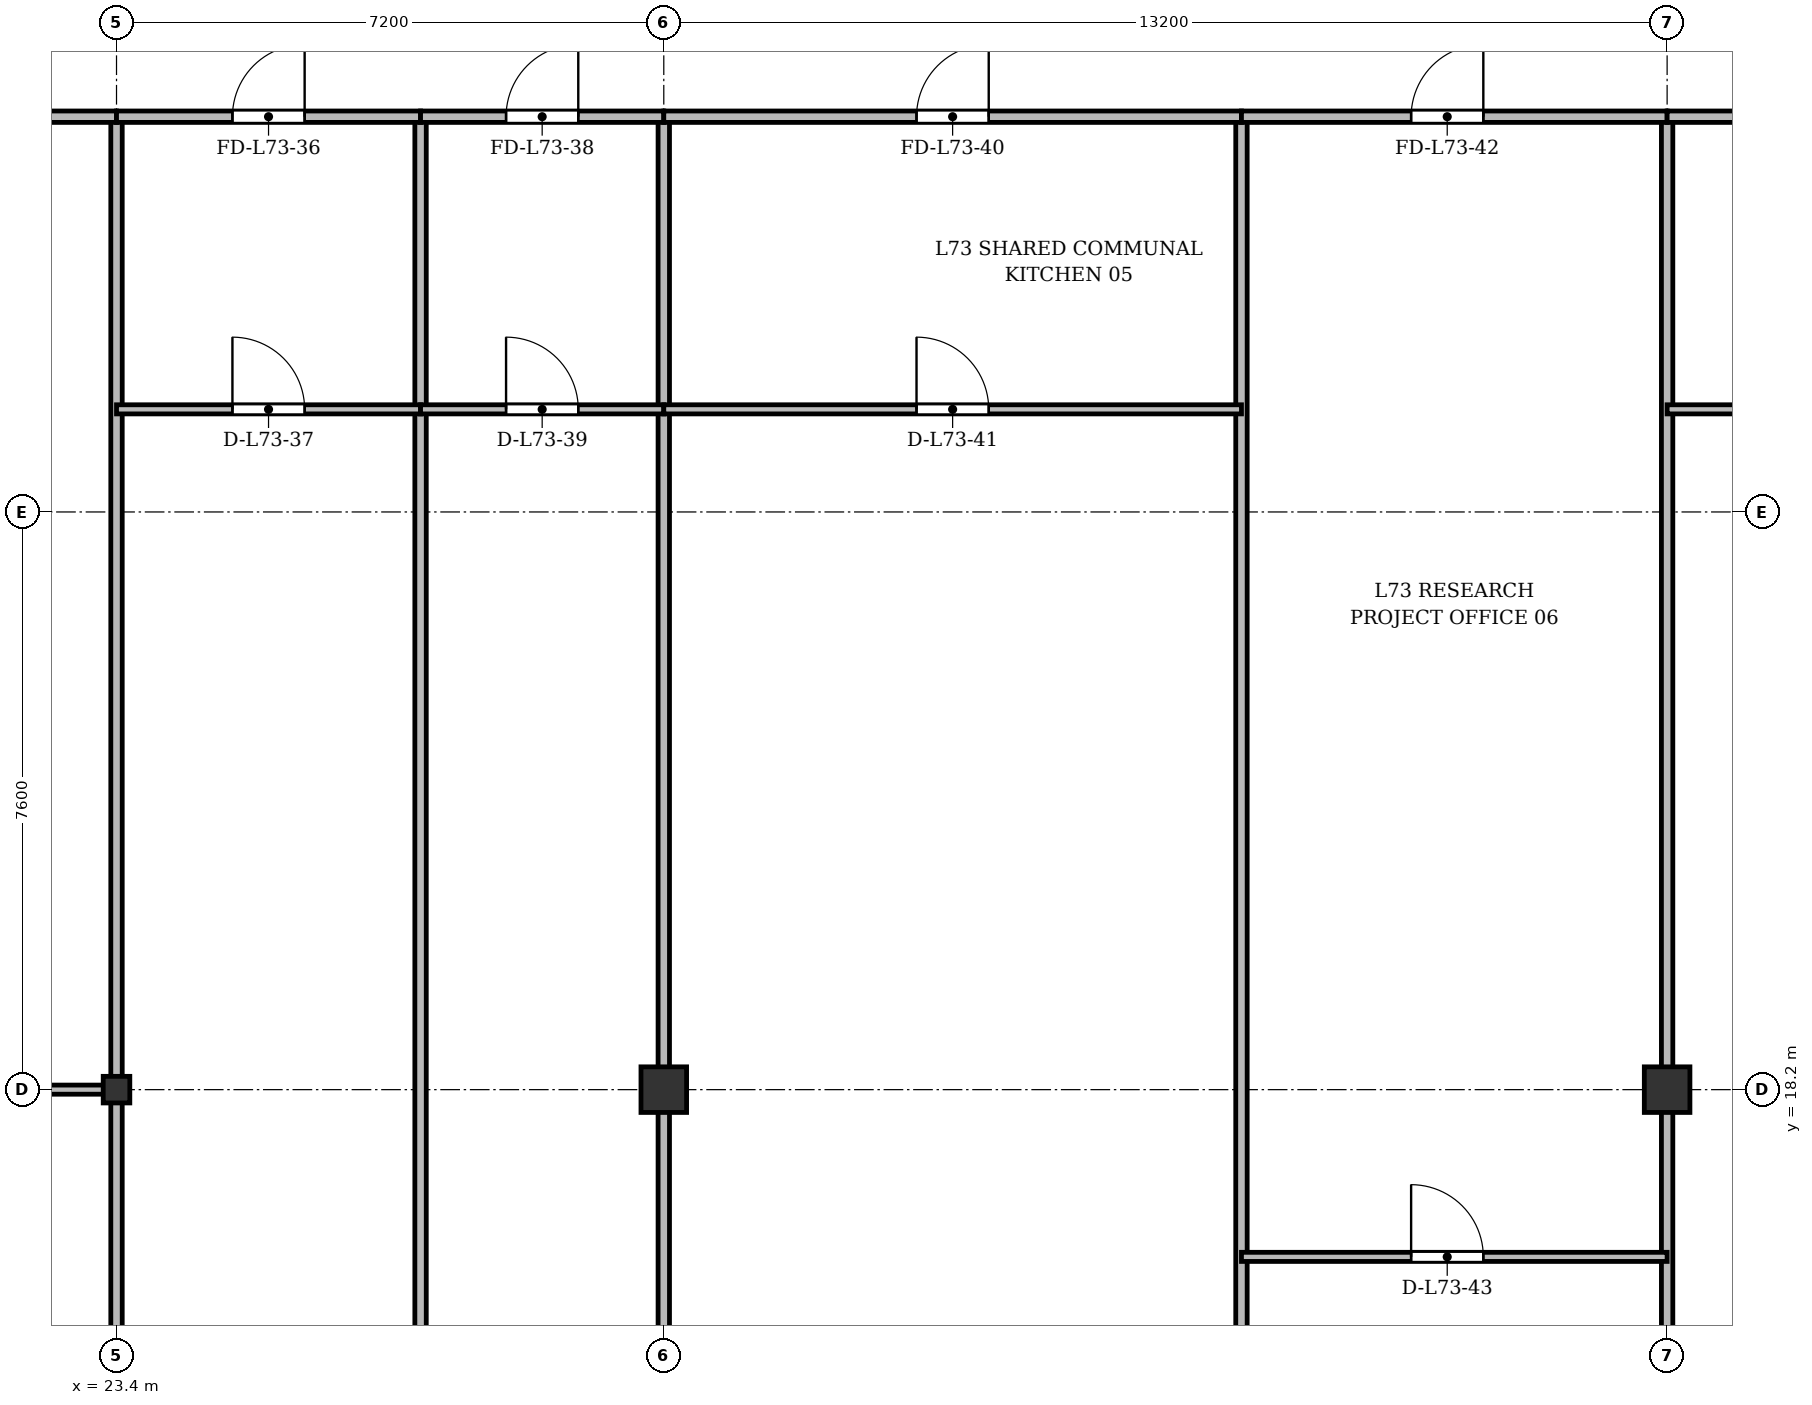
"""IFC4 building model, lengths in metres.
Left out: names, types, materials, properties, quantities, classifications, styles, units other than length and angle.
Written with IfcOpenShell. Run it as: python <this file> out.ifc"""

import sys

from ifc_helpers import new_model, si_unit, direction, frame, frame_2d, origin, origin_2d, place, context, subcontext, project, spatial, rectangle, i_section, extrude, source, transform, mapped, element, fill, save


model = new_model("IFC4")
c1 = context("Model", 3, precision=1e-05, world=origin(), true_north=direction((0.0, 1.0)))
c2 = subcontext(c1, "Body", "Model", "MODEL_VIEW")
j1 = project(units=[si_unit("LENGTHUNIT", "METRE"), si_unit("PLANEANGLEUNIT", "RADIAN")], contexts=[c1])
p1 = place(None, origin())
s1 = spatial("IfcSite", under=j1, at=p1, CompositionType="ELEMENT")
p2 = place(p1, origin())
s2 = spatial("IfcBuilding", under=s1, at=p2, CompositionType="ELEMENT")
p3 = place(p2, frame((0.0, 0.0, 281.1)))
s3 = spatial("IfcBuildingStorey", under=s2, at=p3, CompositionType="ELEMENT", Elevation=281.1)
m1 = source(origin(), c2, "Body", "SweptSolid", [
    extrude(i_section(OverallWidth=0.35, OverallDepth=0.35, WebThickness=0.018, FlangeThickness=0.028, at=origin_2d()), origin(), (0.0, 0.0, 1.0), 3.6),
])
p4 = place(p3, frame((23.4, 18.2, 0.0), z_axis=(0.0, 0.0, 1.0), x_axis=(1.0, 0.0, 0.0)))
e1 = element("IfcColumn", 1, at=p4, inside=s3, PredefinedType="COLUMN", context=c2, shape_type="MappedRepresentation", body=[
    mapped(m1, transform((0.0, 0.0, 0.0), x_axis=(1.0, 0.0, 0.0), y_axis=(0.0, 1.0, 0.0), z_axis=(0.0, 0.0, 1.0), scale=1.0)),
])
m2 = source(origin(), c2, "Body", "SweptSolid", [
    extrude(rectangle(XDim=0.6, YDim=0.6, at=origin_2d()), origin(), (0.0, 0.0, 1.0), 3.6),
])
for number, where, z_axis, x_axis in (
    (2, (30.6, 18.2, 0.0), (0.0, 0.0, 1.0), (1.0, 0.0, 0.0)),
    (3, (43.8, 18.2, 0.0), (0.0, 0.0, 1.0), (1.0, 0.0, 0.0)),
):
    element("IfcColumn", number, at=place(p3, frame(where, z_axis=z_axis, x_axis=x_axis)), inside=s3, PredefinedType="COLUMN", context=c2, shape_type="MappedRepresentation", body=[
        mapped(m2, transform((0.0, 0.0, 0.0), x_axis=(1.0, 0.0, 0.0), y_axis=(0.0, 1.0, 0.0), z_axis=(0.0, 0.0, 1.0), scale=1.0)),
    ])
p5 = place(p3, frame((23.4, 3.725, 0.0), z_axis=(0.0, 0.0, 1.0), x_axis=(0.0, 1.0, 0.0)))
e4 = element("IfcWall", 4, at=p5, inside=s3, PredefinedType="PARTITIONING", context=c2, shape_type="SweptSolid", body=[
    extrude(rectangle(XDim=27.275, YDim=0.15, at=frame_2d((13.637, 0.0))), origin(), (0.0, 0.0, 1.0), 2.87),
])
p6 = place(p3, frame((27.4, 3.725, 0.0), z_axis=(0.0, 0.0, 1.0), x_axis=(0.0, 1.0, 0.0)))
e5 = element("IfcWall", 5, at=p6, inside=s3, PredefinedType="PARTITIONING", context=c2, shape_type="SweptSolid", body=[
    extrude(rectangle(XDim=27.275, YDim=0.15, at=frame_2d((13.637, 0.0))), origin(), (0.0, 0.0, 1.0), 2.92),
])
p7 = place(p3, frame((30.6, 3.725, 0.0), z_axis=(0.0, 0.0, 1.0), x_axis=(0.0, 1.0, 0.0)))
e6 = element("IfcWall", 6, at=p7, inside=s3, PredefinedType="PARTITIONING", context=c2, shape_type="SweptSolid", body=[
    extrude(rectangle(XDim=27.275, YDim=0.15, at=frame_2d((13.637, 0.0))), origin(), (0.0, 0.0, 1.0), 2.87),
])
p8 = place(p3, frame((38.2, 3.725, 0.0), z_axis=(0.0, 0.0, 1.0), x_axis=(0.0, 1.0, 0.0)))
e7 = element("IfcWall", 7, at=p8, inside=s3, PredefinedType="PARTITIONING", context=c2, shape_type="SweptSolid", body=[
    extrude(rectangle(XDim=27.275, YDim=0.15, at=frame_2d((13.637, 0.0))), origin(), (0.0, 0.0, 1.0), 2.92),
])
p9 = place(p3, frame((43.8, 3.725, 0.0), z_axis=(0.0, 0.0, 1.0), x_axis=(0.0, 1.0, 0.0)))
e8 = element("IfcWall", 8, at=p9, inside=s3, PredefinedType="PARTITIONING", context=c2, shape_type="SweptSolid", body=[
    extrude(rectangle(XDim=27.275, YDim=0.15, at=frame_2d((13.637, 0.0))), origin(), (0.0, 0.0, 1.0), 2.87),
])
p10 = place(p3, frame((14.4, 18.2, 0.0), z_axis=(0.0, 0.0, 1.0), x_axis=(1.0, 0.0, 0.0)))
e9 = element("IfcWall", 9, at=p10, inside=s3, PredefinedType="PARTITIONING", context=c2, shape_type="SweptSolid", body=[
    extrude(rectangle(XDim=9.0, YDim=0.12, at=frame_2d((4.5, 0.0))), origin(), (0.0, 0.0, 1.0), 2.92),
])
p11 = place(p10, frame((4.025, 0.0, 0.0)))
e10 = element("IfcOpeningElement", 10, at=p11, cuts=e9, PredefinedType="OPENING", context=c2, shape_type="SweptSolid", body=[
    extrude(rectangle(XDim=0.95, YDim=2.15, at=frame_2d((0.475, 1.075))), frame((0.0, 0.07, 0.0), z_axis=(0.0, -1.0, 0.0), x_axis=(1.0, 0.0, 0.0)), (0.0, 0.0, 1.0), 0.14),
])
p12 = place(p3, frame((14.4, 31.0, 0.0), z_axis=(0.0, 0.0, 1.0), x_axis=(1.0, 0.0, 0.0)))
e11 = element("IfcWall", 11, at=p12, inside=s3, PredefinedType="PARTITIONING", context=c2, shape_type="SweptSolid", body=[
    extrude(rectangle(XDim=9.0, YDim=0.15, at=frame_2d((4.5, 0.0))), origin(), (0.0, 0.0, 1.0), 2.87),
])
p13 = place(p12, frame((5.971, 0.0, 0.0)))
e12 = element("IfcOpeningElement", 12, at=p13, cuts=e11, PredefinedType="OPENING", context=c2, shape_type="SweptSolid", body=[
    extrude(rectangle(XDim=0.95, YDim=2.15, at=frame_2d((0.475, 1.075))), frame((0.0, 0.085, 0.0), z_axis=(0.0, -1.0, 0.0), x_axis=(1.0, 0.0, 0.0)), (0.0, 0.0, 1.0), 0.17),
])
p14 = place(p3, frame((23.4, 31.0, 0.0), z_axis=(0.0, 0.0, 1.0), x_axis=(1.0, 0.0, 0.0)))
e13 = element("IfcWall", 13, at=p14, inside=s3, PredefinedType="PARTITIONING", context=c2, shape_type="SweptSolid", body=[
    extrude(rectangle(XDim=4.0, YDim=0.15, at=frame_2d((2.0, 0.0))), origin(), (0.0, 0.0, 1.0), 2.87),
])
p15 = place(p14, frame((1.525, 0.0, 0.0)))
e14 = element("IfcOpeningElement", 14, at=p15, cuts=e13, PredefinedType="OPENING", context=c2, shape_type="SweptSolid", body=[
    extrude(rectangle(XDim=0.95, YDim=2.15, at=frame_2d((0.475, 1.075))), frame((0.0, 0.085, 0.0), z_axis=(0.0, -1.0, 0.0), x_axis=(1.0, 0.0, 0.0)), (0.0, 0.0, 1.0), 0.17),
])
p16 = place(p3, frame((23.4, 27.15, 0.0), z_axis=(0.0, 0.0, 1.0), x_axis=(1.0, 0.0, 0.0)))
e15 = element("IfcWall", 15, at=p16, inside=s3, PredefinedType="PARTITIONING", context=c2, shape_type="SweptSolid", body=[
    extrude(rectangle(XDim=4.0, YDim=0.12, at=frame_2d((2.0, 0.0))), origin(), (0.0, 0.0, 1.0), 2.87),
])
p17 = place(p16, frame((1.525, 0.0, 0.0)))
e16 = element("IfcOpeningElement", 16, at=p17, cuts=e15, PredefinedType="OPENING", context=c2, shape_type="SweptSolid", body=[
    extrude(rectangle(XDim=0.95, YDim=2.15, at=frame_2d((0.475, 1.075))), frame((0.0, 0.07, 0.0), z_axis=(0.0, -1.0, 0.0), x_axis=(1.0, 0.0, 0.0)), (0.0, 0.0, 1.0), 0.14),
])
p18 = place(p3, frame((27.4, 31.0, 0.0), z_axis=(0.0, 0.0, 1.0), x_axis=(1.0, 0.0, 0.0)))
e17 = element("IfcWall", 17, at=p18, inside=s3, PredefinedType="PARTITIONING", context=c2, shape_type="SweptSolid", body=[
    extrude(rectangle(XDim=3.2, YDim=0.15, at=frame_2d((1.6, 0.0))), origin(), (0.0, 0.0, 1.0), 2.87),
])
p19 = place(p18, frame((1.125, 0.0, 0.0)))
e18 = element("IfcOpeningElement", 18, at=p19, cuts=e17, PredefinedType="OPENING", context=c2, shape_type="SweptSolid", body=[
    extrude(rectangle(XDim=0.95, YDim=2.15, at=frame_2d((0.475, 1.075))), frame((0.0, 0.085, 0.0), z_axis=(0.0, -1.0, 0.0), x_axis=(1.0, 0.0, 0.0)), (0.0, 0.0, 1.0), 0.17),
])
p20 = place(p3, frame((27.4, 27.15, 0.0), z_axis=(0.0, 0.0, 1.0), x_axis=(1.0, 0.0, 0.0)))
e19 = element("IfcWall", 19, at=p20, inside=s3, PredefinedType="PARTITIONING", context=c2, shape_type="SweptSolid", body=[
    extrude(rectangle(XDim=3.2, YDim=0.12, at=frame_2d((1.6, 0.0))), origin(), (0.0, 0.0, 1.0), 2.87),
])
p21 = place(p20, frame((1.125, 0.0, 0.0)))
e20 = element("IfcOpeningElement", 20, at=p21, cuts=e19, PredefinedType="OPENING", context=c2, shape_type="SweptSolid", body=[
    extrude(rectangle(XDim=0.95, YDim=2.15, at=frame_2d((0.475, 1.075))), frame((0.0, 0.07, 0.0), z_axis=(0.0, -1.0, 0.0), x_axis=(1.0, 0.0, 0.0)), (0.0, 0.0, 1.0), 0.14),
])
p22 = place(p3, frame((30.6, 31.0, 0.0), z_axis=(0.0, 0.0, 1.0), x_axis=(1.0, 0.0, 0.0)))
e21 = element("IfcWall", 21, at=p22, inside=s3, PredefinedType="PARTITIONING", context=c2, shape_type="SweptSolid", body=[
    extrude(rectangle(XDim=7.6, YDim=0.15, at=frame_2d((3.8, 0.0))), origin(), (0.0, 0.0, 1.0), 2.87),
])
p23 = place(p22, frame((3.325, 0.0, 0.0)))
e22 = element("IfcOpeningElement", 22, at=p23, cuts=e21, PredefinedType="OPENING", context=c2, shape_type="SweptSolid", body=[
    extrude(rectangle(XDim=0.95, YDim=2.15, at=frame_2d((0.475, 1.075))), frame((0.0, 0.085, 0.0), z_axis=(0.0, -1.0, 0.0), x_axis=(1.0, 0.0, 0.0)), (0.0, 0.0, 1.0), 0.17),
])
p24 = place(p3, frame((30.6, 27.15, 0.0), z_axis=(0.0, 0.0, 1.0), x_axis=(1.0, 0.0, 0.0)))
e23 = element("IfcWall", 23, at=p24, inside=s3, PredefinedType="PARTITIONING", context=c2, shape_type="SweptSolid", body=[
    extrude(rectangle(XDim=7.6, YDim=0.12, at=frame_2d((3.8, 0.0))), origin(), (0.0, 0.0, 1.0), 2.87),
])
p25 = place(p24, frame((3.325, 0.0, 0.0)))
e24 = element("IfcOpeningElement", 24, at=p25, cuts=e23, PredefinedType="OPENING", context=c2, shape_type="SweptSolid", body=[
    extrude(rectangle(XDim=0.95, YDim=2.15, at=frame_2d((0.475, 1.075))), frame((0.0, 0.07, 0.0), z_axis=(0.0, -1.0, 0.0), x_axis=(1.0, 0.0, 0.0)), (0.0, 0.0, 1.0), 0.14),
])
p26 = place(p3, frame((38.2, 31.0, 0.0), z_axis=(0.0, 0.0, 1.0), x_axis=(1.0, 0.0, 0.0)))
e25 = element("IfcWall", 25, at=p26, inside=s3, PredefinedType="PARTITIONING", context=c2, shape_type="SweptSolid", body=[
    extrude(rectangle(XDim=5.6, YDim=0.15, at=frame_2d((2.8, 0.0))), origin(), (0.0, 0.0, 1.0), 2.87),
])
p27 = place(p26, frame((2.232, 0.0, 0.0)))
e26 = element("IfcOpeningElement", 26, at=p27, cuts=e25, PredefinedType="OPENING", context=c2, shape_type="SweptSolid", body=[
    extrude(rectangle(XDim=0.95, YDim=2.15, at=frame_2d((0.475, 1.075))), frame((0.0, 0.085, 0.0), z_axis=(0.0, -1.0, 0.0), x_axis=(1.0, 0.0, 0.0)), (0.0, 0.0, 1.0), 0.17),
])
p28 = place(p3, frame((38.2, 16.0, 0.0), z_axis=(0.0, 0.0, 1.0), x_axis=(1.0, 0.0, 0.0)))
e27 = element("IfcWall", 27, at=p28, inside=s3, PredefinedType="PARTITIONING", context=c2, shape_type="SweptSolid", body=[
    extrude(rectangle(XDim=5.6, YDim=0.12, at=frame_2d((2.8, 0.0))), origin(), (0.0, 0.0, 1.0), 2.87),
])
p29 = place(p28, frame((2.232, 0.0, 0.0)))
e28 = element("IfcOpeningElement", 28, at=p29, cuts=e27, PredefinedType="OPENING", context=c2, shape_type="SweptSolid", body=[
    extrude(rectangle(XDim=0.95, YDim=2.15, at=frame_2d((0.475, 1.075))), frame((0.0, 0.07, 0.0), z_axis=(0.0, -1.0, 0.0), x_axis=(1.0, 0.0, 0.0)), (0.0, 0.0, 1.0), 0.14),
])
p30 = place(p3, frame((43.8, 31.0, 0.0), z_axis=(0.0, 0.0, 1.0), x_axis=(1.0, 0.0, 0.0)))
e29 = element("IfcWall", 29, at=p30, inside=s3, PredefinedType="PARTITIONING", context=c2, shape_type="SweptSolid", body=[
    extrude(rectangle(XDim=3.2, YDim=0.15, at=frame_2d((1.6, 0.0))), origin(), (0.0, 0.0, 1.0), 2.87),
])
p31 = place(p30, frame((1.125, 0.0, 0.0)))
e30 = element("IfcOpeningElement", 30, at=p31, cuts=e29, PredefinedType="OPENING", context=c2, shape_type="SweptSolid", body=[
    extrude(rectangle(XDim=0.95, YDim=2.15, at=frame_2d((0.475, 1.075))), frame((0.0, 0.085, 0.0), z_axis=(0.0, -1.0, 0.0), x_axis=(1.0, 0.0, 0.0)), (0.0, 0.0, 1.0), 0.17),
])
p32 = place(p3, frame((43.8, 27.15, 0.0), z_axis=(0.0, 0.0, 1.0), x_axis=(1.0, 0.0, 0.0)))
e31 = element("IfcWall", 31, at=p32, inside=s3, PredefinedType="PARTITIONING", context=c2, shape_type="SweptSolid", body=[
    extrude(rectangle(XDim=3.2, YDim=0.12, at=frame_2d((1.6, 0.0))), origin(), (0.0, 0.0, 1.0), 2.87),
])
p33 = place(p32, frame((1.125, 0.0, 0.0)))
e32 = element("IfcOpeningElement", 32, at=p33, cuts=e31, PredefinedType="OPENING", context=c2, shape_type="SweptSolid", body=[
    extrude(rectangle(XDim=0.95, YDim=2.15, at=frame_2d((0.475, 1.075))), frame((0.0, 0.07, 0.0), z_axis=(0.0, -1.0, 0.0), x_axis=(1.0, 0.0, 0.0)), (0.0, 0.0, 1.0), 0.14),
])
m3 = source(origin(), c2, "Body", "SweptSolid", [
    extrude(rectangle(XDim=0.95, YDim=2.15, at=frame_2d((0.475, 1.075))), frame((0.0, 0.025, 0.0), z_axis=(0.0, -1.0, 0.0), x_axis=(1.0, 0.0, 0.0)), (0.0, 0.0, 1.0), 0.05),
])
p34 = place(p15, origin())
e33 = element("IfcDoor", 33, at=p34, inside=s3, OperationType="SINGLE_SWING_RIGHT", PredefinedType="DOOR", context=c2, shape_type="MappedRepresentation", body=[
    mapped(m3, transform((0.0, 0.0, 0.0), x_axis=(1.0, 0.0, 0.0), y_axis=(0.0, 1.0, 0.0), z_axis=(0.0, 0.0, 1.0), scale=1.0)),
])
fill(e14, e33)
p35 = place(p17, origin())
e34 = element("IfcDoor", 34, at=p35, inside=s3, OperationType="SINGLE_SWING_LEFT", PredefinedType="DOOR", context=c2, shape_type="MappedRepresentation", body=[
    mapped(m3, transform((0.0, 0.0, 0.0), x_axis=(1.0, 0.0, 0.0), y_axis=(0.0, 1.0, 0.0), z_axis=(0.0, 0.0, 1.0), scale=1.0)),
])
fill(e16, e34)
p36 = place(p19, origin())
e35 = element("IfcDoor", 35, at=p36, inside=s3, OperationType="SINGLE_SWING_RIGHT", PredefinedType="DOOR", context=c2, shape_type="MappedRepresentation", body=[
    mapped(m3, transform((0.0, 0.0, 0.0), x_axis=(1.0, 0.0, 0.0), y_axis=(0.0, 1.0, 0.0), z_axis=(0.0, 0.0, 1.0), scale=1.0)),
])
fill(e18, e35)
p37 = place(p21, origin())
e36 = element("IfcDoor", 36, at=p37, inside=s3, OperationType="SINGLE_SWING_LEFT", PredefinedType="DOOR", context=c2, shape_type="MappedRepresentation", body=[
    mapped(m3, transform((0.0, 0.0, 0.0), x_axis=(1.0, 0.0, 0.0), y_axis=(0.0, 1.0, 0.0), z_axis=(0.0, 0.0, 1.0), scale=1.0)),
])
fill(e20, e36)
p38 = place(p23, origin())
e37 = element("IfcDoor", 37, at=p38, inside=s3, OperationType="SINGLE_SWING_RIGHT", PredefinedType="DOOR", context=c2, shape_type="MappedRepresentation", body=[
    mapped(m3, transform((0.0, 0.0, 0.0), x_axis=(1.0, 0.0, 0.0), y_axis=(0.0, 1.0, 0.0), z_axis=(0.0, 0.0, 1.0), scale=1.0)),
])
fill(e22, e37)
p39 = place(p25, origin())
e38 = element("IfcDoor", 38, at=p39, inside=s3, OperationType="SINGLE_SWING_LEFT", PredefinedType="DOOR", context=c2, shape_type="MappedRepresentation", body=[
    mapped(m3, transform((0.0, 0.0, 0.0), x_axis=(1.0, 0.0, 0.0), y_axis=(0.0, 1.0, 0.0), z_axis=(0.0, 0.0, 1.0), scale=1.0)),
])
fill(e24, e38)
p40 = place(p27, origin())
e39 = element("IfcDoor", 39, at=p40, inside=s3, OperationType="SINGLE_SWING_RIGHT", PredefinedType="DOOR", context=c2, shape_type="MappedRepresentation", body=[
    mapped(m3, transform((0.0, 0.0, 0.0), x_axis=(1.0, 0.0, 0.0), y_axis=(0.0, 1.0, 0.0), z_axis=(0.0, 0.0, 1.0), scale=1.0)),
])
fill(e26, e39)
p41 = place(p29, origin())
e40 = element("IfcDoor", 40, at=p41, inside=s3, OperationType="SINGLE_SWING_LEFT", PredefinedType="DOOR", context=c2, shape_type="MappedRepresentation", body=[
    mapped(m3, transform((0.0, 0.0, 0.0), x_axis=(1.0, 0.0, 0.0), y_axis=(0.0, 1.0, 0.0), z_axis=(0.0, 0.0, 1.0), scale=1.0)),
])
fill(e28, e40)
save(model, sys.argv[1])
